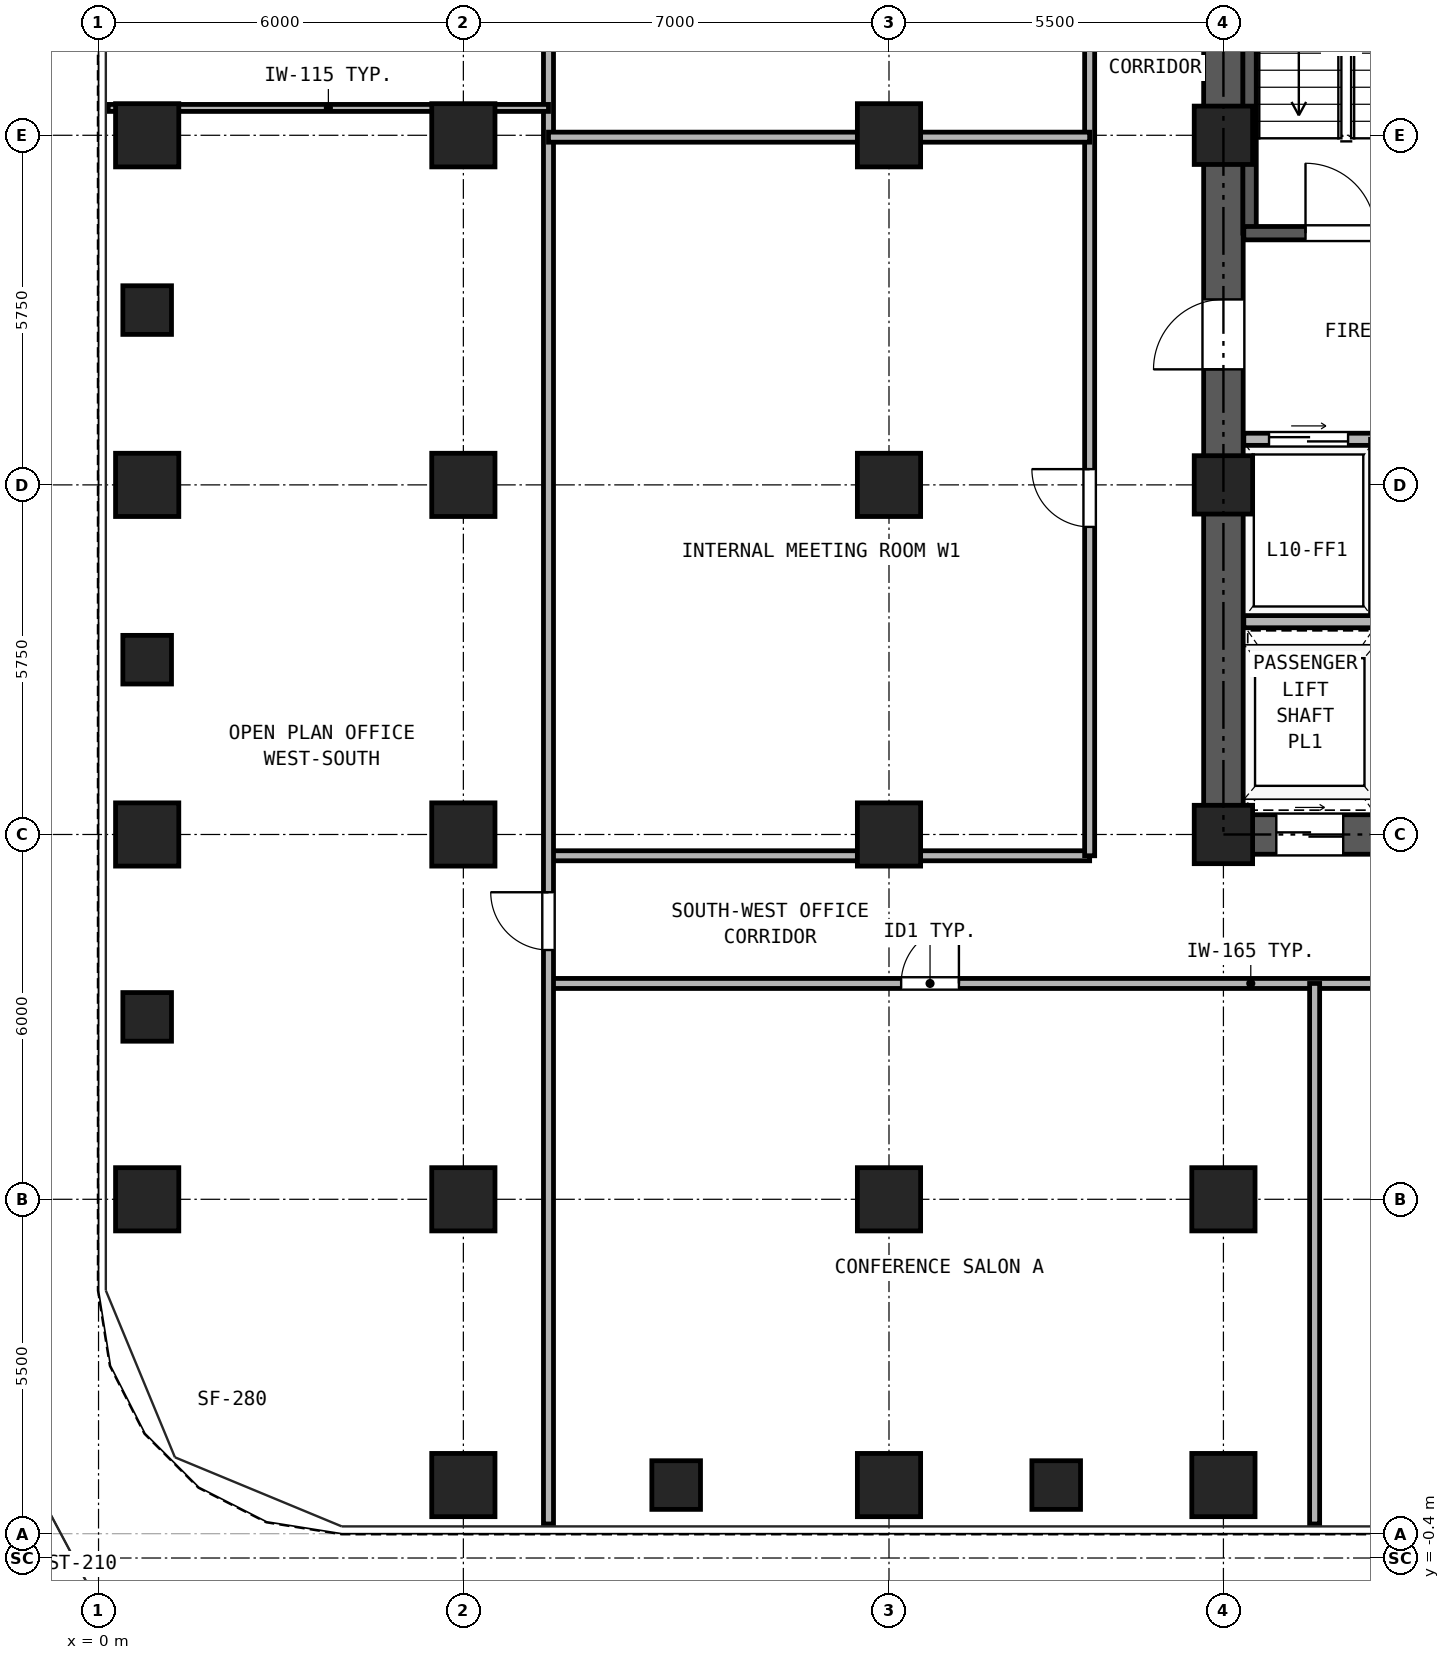
"""IFC4 building model, lengths in metres.
Left out: names, types, materials, properties, quantities, classifications, styles, units other than length and angle.
Written with IfcOpenShell. Run it as: python <this file> out.ifc"""

import sys

from ifc_helpers import new_model, si_unit, direction, frame, frame_2d, origin, origin_2d, place, context, subcontext, project, spatial, rectangle, hollow_rectangle, extrude, source, transform, mapped, element, fill, save


model = new_model("IFC4")
c1 = context("Model", 3, precision=1e-05, world=origin(), true_north=direction((0.0, 1.0)))
c2 = subcontext(c1, "Body", "Model", "MODEL_VIEW")
j1 = project(units=[si_unit("LENGTHUNIT", "METRE"), si_unit("PLANEANGLEUNIT", "RADIAN")], contexts=[c1])
p1 = place(None, origin())
s1 = spatial("IfcSite", under=j1, at=p1, CompositionType="ELEMENT")
p2 = place(p1, origin())
s2 = spatial("IfcBuilding", under=s1, at=p2, CompositionType="ELEMENT")
p3 = place(p2, frame((0.0, 0.0, 40.5)))
s3 = spatial("IfcBuildingStorey", under=s2, at=p3, CompositionType="ELEMENT", Elevation=40.5)
m1 = source(origin(), c2, "Body", "SweptSolid", [
    extrude(hollow_rectangle(XDim=1.04, YDim=1.04, WallThickness=0.065, at=origin_2d()), origin(), (0.0, 0.0, 1.0), 3.32),
])
for number, where, z_axis, x_axis in (
    (1, (6.0, 0.8, 0.0), (0.0, 0.0, 1.0), (1.0, 0.0, 0.0)),
    (2, (13.0, 0.8, 0.0), (0.0, 0.0, 1.0), (1.0, 0.0, 0.0)),
    (3, (18.5, 0.8, 0.0), (0.0, 0.0, 1.0), (1.0, 0.0, 0.0)),
    (4, (0.8, 5.5, 0.0), (0.0, 0.0, 1.0), (1.0, 0.0, 0.0)),
    (5, (0.8, 11.5, 0.0), (0.0, 0.0, 1.0), (1.0, 0.0, 0.0)),
    (6, (0.8, 17.25, 0.0), (0.0, 0.0, 1.0), (1.0, 0.0, 0.0)),
    (7, (0.8, 23.0, 0.0), (0.0, 0.0, 1.0), (1.0, 0.0, 0.0)),
    (8, (6.0, 5.5, 0.0), (0.0, 0.0, 1.0), (1.0, 0.0, 0.0)),
    (9, (6.0, 11.5, 0.0), (0.0, 0.0, 1.0), (1.0, 0.0, 0.0)),
    (10, (6.0, 17.25, 0.0), (0.0, 0.0, 1.0), (1.0, 0.0, 0.0)),
    (11, (6.0, 23.0, 0.0), (0.0, 0.0, 1.0), (1.0, 0.0, 0.0)),
    (12, (13.0, 5.5, 0.0), (0.0, 0.0, 1.0), (1.0, 0.0, 0.0)),
    (13, (13.0, 11.5, 0.0), (0.0, 0.0, 1.0), (1.0, 0.0, 0.0)),
    (14, (13.0, 17.25, 0.0), (0.0, 0.0, 1.0), (1.0, 0.0, 0.0)),
    (15, (13.0, 23.0, 0.0), (0.0, 0.0, 1.0), (1.0, 0.0, 0.0)),
    (16, (18.5, 5.5, 0.0), (0.0, 0.0, 1.0), (1.0, 0.0, 0.0)),
):
    element("IfcColumn", number, at=place(p3, frame(where, z_axis=z_axis, x_axis=x_axis)), inside=s3, PredefinedType="COLUMN", context=c2, shape_type="MappedRepresentation", body=[
        mapped(m1, transform((0.0, 0.0, 0.0), x_axis=(1.0, 0.0, 0.0), y_axis=(0.0, 1.0, 0.0), z_axis=(0.0, 0.0, 1.0), scale=1.0)),
    ])
m2 = source(origin(), c2, "Body", "SweptSolid", [
    extrude(hollow_rectangle(XDim=0.96, YDim=0.96, WallThickness=0.06, at=origin_2d()), origin(), (0.0, 0.0, 1.0), 3.32),
])
for number, where, z_axis, x_axis in (
    (17, (18.5, 11.5, 0.0), (0.0, 0.0, 1.0), (1.0, 0.0, 0.0)),
    (18, (18.5, 17.25, 0.0), (0.0, 0.0, 1.0), (1.0, 0.0, 0.0)),
    (19, (18.5, 23.0, 0.0), (0.0, 0.0, 1.0), (1.0, 0.0, 0.0)),
):
    element("IfcColumn", number, at=place(p3, frame(where, z_axis=z_axis, x_axis=x_axis)), inside=s3, PredefinedType="COLUMN", context=c2, shape_type="MappedRepresentation", body=[
        mapped(m2, transform((0.0, 0.0, 0.0), x_axis=(1.0, 0.0, 0.0), y_axis=(0.0, 1.0, 0.0), z_axis=(0.0, 0.0, 1.0), scale=1.0)),
    ])
m3 = source(origin(), c2, "Body", "SweptSolid", [
    extrude(hollow_rectangle(XDim=0.8, YDim=0.8, WallThickness=0.045, at=origin_2d()), origin(), (0.0, 0.0, 1.0), 3.32),
])
for number, where, z_axis, x_axis in (
    (20, (9.5, 0.8, 0.0), (0.0, 0.0, 1.0), (1.0, 0.0, 0.0)),
    (21, (15.75, 0.8, 0.0), (0.0, 0.0, 1.0), (1.0, 0.0, 0.0)),
    (22, (0.8, 8.5, 0.0), (0.0, 0.0, 1.0), (1.0, 0.0, 0.0)),
    (23, (0.8, 14.375, 0.0), (0.0, 0.0, 1.0), (1.0, 0.0, 0.0)),
    (24, (0.8, 20.125, 0.0), (0.0, 0.0, 1.0), (1.0, 0.0, 0.0)),
):
    element("IfcColumn", number, at=place(p3, frame(where, z_axis=z_axis, x_axis=x_axis)), inside=s3, PredefinedType="COLUMN", context=c2, shape_type="MappedRepresentation", body=[
        mapped(m3, transform((0.0, 0.0, 0.0), x_axis=(1.0, 0.0, 0.0), y_axis=(0.0, 1.0, 0.0), z_axis=(0.0, 0.0, 1.0), scale=1.0)),
    ])
p4 = place(p3, frame((18.175, 11.5, 0.0), z_axis=(0.0, 0.0, 1.0), x_axis=(1.0, 0.0, 0.0)))
e25 = element("IfcWall", 25, at=p4, inside=s3, PredefinedType="SHEAR", context=c2, shape_type="SweptSolid", body=[
    extrude(rectangle(XDim=10.65, YDim=0.65, at=frame_2d((5.325, 0.0))), origin(), (0.0, 0.0, 1.0), 3.32),
])
p5 = place(p4, frame((1.195, 0.0, 0.0)))
e26 = element("IfcOpeningElement", 26, at=p5, cuts=e25, PredefinedType="OPENING", context=c2, shape_type="SweptSolid", body=[
    extrude(rectangle(XDim=1.1, YDim=2.25, at=frame_2d((0.55, 1.125))), frame((0.0, 0.335, 0.0), z_axis=(0.0, -1.0, 0.0), x_axis=(1.0, 0.0, 0.0)), (0.0, 0.0, 1.0), 0.67),
])
p6 = place(p4, frame((3.495, 0.0, 0.0)))
e27 = element("IfcOpeningElement", 27, at=p6, cuts=e25, PredefinedType="OPENING", context=c2, shape_type="SweptSolid", body=[
    extrude(rectangle(XDim=1.1, YDim=2.25, at=frame_2d((0.55, 1.125))), frame((0.0, 0.335, 0.0), z_axis=(0.0, -1.0, 0.0), x_axis=(1.0, 0.0, 0.0)), (0.0, 0.0, 1.0), 0.67),
])
p7 = place(p4, frame((5.925, 0.0, 0.0)))
e28 = element("IfcOpeningElement", 28, at=p7, cuts=e25, PredefinedType="OPENING", context=c2, shape_type="SweptSolid", body=[
    extrude(rectangle(XDim=1.1, YDim=2.25, at=frame_2d((0.55, 1.125))), frame((0.0, 0.335, 0.0), z_axis=(0.0, -1.0, 0.0), x_axis=(1.0, 0.0, 0.0)), (0.0, 0.0, 1.0), 0.67),
])
p8 = place(p4, frame((8.325, 0.0, 0.0)))
e29 = element("IfcOpeningElement", 29, at=p8, cuts=e25, PredefinedType="OPENING", context=c2, shape_type="SweptSolid", body=[
    extrude(rectangle(XDim=1.1, YDim=2.25, at=frame_2d((0.55, 1.125))), frame((0.0, 0.335, 0.0), z_axis=(0.0, -1.0, 0.0), x_axis=(1.0, 0.0, 0.0)), (0.0, 0.0, 1.0), 0.67),
])
p9 = place(p3, frame((18.5, 11.825, 0.0), z_axis=(0.0, 0.0, 1.0), x_axis=(0.0, 1.0, 0.0)))
e30 = element("IfcWall", 30, at=p9, inside=s3, PredefinedType="SHEAR", context=c2, shape_type="SweptSolid", body=[
    extrude(rectangle(XDim=16.6, YDim=0.65, at=frame_2d((8.3, 0.0))), origin(), (0.0, 0.0, 1.0), 3.32),
])
p10 = place(p9, frame((7.325, 0.0, 0.0)))
e31 = element("IfcOpeningElement", 31, at=p10, cuts=e30, PredefinedType="OPENING", context=c2, shape_type="SweptSolid", body=[
    extrude(rectangle(XDim=1.15, YDim=2.2, at=frame_2d((0.575, 1.1))), frame((0.0, 0.335, 0.0), z_axis=(0.0, -1.0, 0.0), x_axis=(1.0, 0.0, 0.0)), (0.0, 0.0, 1.0), 0.67),
])
p11 = place(p3, frame((18.93, 21.39, 0.0), z_axis=(0.0, 0.0, 1.0), x_axis=(0.0, 1.0, 0.0)))
e32 = element("IfcWall", 32, at=p11, inside=s3, PredefinedType="SOLIDWALL", context=c2, shape_type="SweptSolid", body=[
    extrude(rectangle(XDim=7.11, YDim=0.22, at=frame_2d((3.555, 0.0))), origin(), (0.0, 0.0, 1.0), 3.32),
])
p12 = place(p3, frame((18.835, 21.39, 0.0), z_axis=(0.0, 0.0, 1.0), x_axis=(1.0, 0.0, 0.0)))
e33 = element("IfcWall", 33, at=p12, inside=s3, PredefinedType="SOLIDWALL", context=c2, shape_type="SweptSolid", body=[
    extrude(rectangle(XDim=6.295, YDim=0.22, at=frame_2d((3.147, 0.0))), origin(), (0.0, 0.0, 1.0), 3.32),
])
p13 = place(p12, frame((1.015, 0.0, 0.0)))
e34 = element("IfcOpeningElement", 34, at=p13, cuts=e33, PredefinedType="OPENING", context=c2, shape_type="SweptSolid", body=[
    extrude(rectangle(XDim=1.15, YDim=2.2, at=frame_2d((0.575, 1.1))), frame((0.0, 0.12, 0.0), z_axis=(0.0, -1.0, 0.0), x_axis=(1.0, 0.0, 0.0)), (0.0, 0.0, 1.0), 0.24),
])
p14 = place(p12, frame((4.745, 0.0, 0.0)))
e35 = element("IfcOpeningElement", 35, at=p14, cuts=e33, PredefinedType="OPENING", context=c2, shape_type="SweptSolid", body=[
    extrude(rectangle(XDim=1.1, YDim=2.25, at=frame_2d((0.55, 1.125))), frame((0.0, 0.12, 0.0), z_axis=(0.0, -1.0, 0.0), x_axis=(1.0, 0.0, 0.0)), (0.0, 0.0, 1.0), 0.24),
])
p15 = place(p3, frame((18.835, 18.0, 0.0), z_axis=(0.0, 0.0, 1.0), x_axis=(1.0, 0.0, 0.0)))
e36 = element("IfcWall", 36, at=p15, inside=s3, PredefinedType="PARTITIONING", context=c2, shape_type="SweptSolid", body=[
    extrude(rectangle(XDim=9.33, YDim=0.2, at=frame_2d((4.665, 0.0))), origin(), (0.0, 0.0, 1.0), 3.32),
])
p16 = place(p15, frame((0.415, 0.0, 0.0)))
e37 = element("IfcOpeningElement", 37, at=p16, cuts=e36, PredefinedType="OPENING", context=c2, shape_type="SweptSolid", body=[
    extrude(rectangle(XDim=1.3, YDim=2.3, at=frame_2d((0.65, 1.15))), frame((0.0, 0.11, 0.0), z_axis=(0.0, -1.0, 0.0), x_axis=(1.0, 0.0, 0.0)), (0.0, 0.0, 1.0), 0.22),
])
p17 = place(p15, frame((2.515, 0.0, 0.0)))
e38 = element("IfcOpeningElement", 38, at=p17, cuts=e36, PredefinedType="OPENING", context=c2, shape_type="SweptSolid", body=[
    extrude(rectangle(XDim=1.3, YDim=2.3, at=frame_2d((0.65, 1.15))), frame((0.0, 0.11, 0.0), z_axis=(0.0, -1.0, 0.0), x_axis=(1.0, 0.0, 0.0)), (0.0, 0.0, 1.0), 0.22),
])
p18 = place(p15, frame((7.015, 0.0, 0.0)))
e39 = element("IfcOpeningElement", 39, at=p18, cuts=e36, PredefinedType="OPENING", context=c2, shape_type="SweptSolid", body=[
    extrude(rectangle(XDim=1.0, YDim=2.15, at=frame_2d((0.5, 1.075))), frame((0.0, 0.11, 0.0), z_axis=(0.0, -1.0, 0.0), x_axis=(1.0, 0.0, 0.0)), (0.0, 0.0, 1.0), 0.22),
])
p19 = place(p3, frame((18.835, 15.0, 0.0), z_axis=(0.0, 0.0, 1.0), x_axis=(1.0, 0.0, 0.0)))
e40 = element("IfcWall", 40, at=p19, inside=s3, PredefinedType="PARTITIONING", context=c2, shape_type="SweptSolid", body=[
    extrude(rectangle(XDim=9.33, YDim=0.2, at=frame_2d((4.665, 0.0))), origin(), (0.0, 0.0, 1.0), 3.32),
])
p20 = place(p3, frame((7.4, 9.05, 0.0), z_axis=(0.0, 0.0, 1.0), x_axis=(1.0, 0.0, 0.0)))
e41 = element("IfcWall", 41, at=p20, inside=s3, PredefinedType="PARTITIONING", context=c2, shape_type="SweptSolid", body=[
    extrude(rectangle(XDim=32.2, YDim=0.165, at=frame_2d((16.1, 0.0))), origin(), (0.0, 0.0, 1.0), 3.32),
])
p21 = place(p20, frame((5.8, 0.0, 0.0)))
e42 = element("IfcOpeningElement", 42, at=p21, cuts=e41, PredefinedType="OPENING", context=c2, shape_type="SweptSolid", body=[
    extrude(rectangle(XDim=0.95, YDim=2.15, at=frame_2d((0.475, 1.075))), frame((0.0, 0.093, 0.0), z_axis=(0.0, -1.0, 0.0), x_axis=(1.0, 0.0, 0.0)), (0.0, 0.0, 1.0), 0.185),
])
p22 = place(p20, frame((16.35, 0.0, 0.0)))
e43 = element("IfcOpeningElement", 43, at=p22, cuts=e41, PredefinedType="OPENING", context=c2, shape_type="SweptSolid", body=[
    extrude(rectangle(XDim=0.95, YDim=2.15, at=frame_2d((0.475, 1.075))), frame((0.0, 0.093, 0.0), z_axis=(0.0, -1.0, 0.0), x_axis=(1.0, 0.0, 0.0)), (0.0, 0.0, 1.0), 0.185),
])
p23 = place(p20, frame((23.6, 0.0, 0.0)))
e44 = element("IfcOpeningElement", 44, at=p23, cuts=e41, PredefinedType="OPENING", context=c2, shape_type="SweptSolid", body=[
    extrude(rectangle(XDim=0.95, YDim=2.15, at=frame_2d((0.475, 1.075))), frame((0.0, 0.093, 0.0), z_axis=(0.0, -1.0, 0.0), x_axis=(1.0, 0.0, 0.0)), (0.0, 0.0, 1.0), 0.185),
])
p24 = place(p20, frame((27.95, 0.0, 0.0)))
e45 = element("IfcOpeningElement", 45, at=p24, cuts=e41, PredefinedType="OPENING", context=c2, shape_type="SweptSolid", body=[
    extrude(rectangle(XDim=0.92, YDim=2.1, at=frame_2d((0.46, 1.05))), frame((0.0, 0.093, 0.0), z_axis=(0.0, -1.0, 0.0), x_axis=(1.0, 0.0, 0.0)), (0.0, 0.0, 1.0), 0.185),
])
p25 = place(p20, frame((30.5, 0.0, 0.0)))
e46 = element("IfcOpeningElement", 46, at=p25, cuts=e41, PredefinedType="OPENING", context=c2, shape_type="SweptSolid", body=[
    extrude(rectangle(XDim=0.92, YDim=2.1, at=frame_2d((0.46, 1.05))), frame((0.0, 0.093, 0.0), z_axis=(0.0, -1.0, 0.0), x_axis=(1.0, 0.0, 0.0)), (0.0, 0.0, 1.0), 0.185),
])
p26 = place(p3, frame((7.4, 11.15, 0.0), z_axis=(0.0, 0.0, 1.0), x_axis=(1.0, 0.0, 0.0)))
e47 = element("IfcWall", 47, at=p26, inside=s3, PredefinedType="PARTITIONING", context=c2, shape_type="SweptSolid", body=[
    extrude(rectangle(XDim=8.9, YDim=0.165, at=frame_2d((4.45, 0.0))), origin(), (0.0, 0.0, 1.0), 3.32),
])
p27 = place(p3, frame((16.3, 11.15, 0.0), z_axis=(0.0, 0.0, 1.0), x_axis=(0.0, 1.0, 0.0)))
e48 = element("IfcWall", 48, at=p27, inside=s3, PredefinedType="PARTITIONING", context=c2, shape_type="SweptSolid", body=[
    extrude(rectangle(XDim=18.25, YDim=0.165, at=frame_2d((9.125, 0.0))), origin(), (0.0, 0.0, 1.0), 3.32),
])
p28 = place(p27, frame((5.409, 0.0, 0.0)))
e49 = element("IfcOpeningElement", 49, at=p28, cuts=e48, PredefinedType="OPENING", context=c2, shape_type="SweptSolid", body=[
    extrude(rectangle(XDim=0.95, YDim=2.15, at=frame_2d((0.475, 1.075))), frame((0.0, 0.093, 0.0), z_axis=(0.0, -1.0, 0.0), x_axis=(1.0, 0.0, 0.0)), (0.0, 0.0, 1.0), 0.185),
])
p29 = place(p27, frame((14.534, 0.0, 0.0)))
e50 = element("IfcOpeningElement", 50, at=p29, cuts=e48, PredefinedType="OPENING", context=c2, shape_type="SweptSolid", body=[
    extrude(rectangle(XDim=0.95, YDim=2.15, at=frame_2d((0.475, 1.075))), frame((0.0, 0.093, 0.0), z_axis=(0.0, -1.0, 0.0), x_axis=(1.0, 0.0, 0.0)), (0.0, 0.0, 1.0), 0.185),
])
p30 = place(p3, frame((7.4, 0.16, 0.0), z_axis=(0.0, 0.0, 1.0), x_axis=(0.0, 1.0, 0.0)))
e51 = element("IfcWall", 51, at=p30, inside=s3, PredefinedType="PARTITIONING", context=c2, shape_type="SweptSolid", body=[
    extrude(rectangle(XDim=40.18, YDim=0.165, at=frame_2d((20.09, 0.0))), origin(), (0.0, 0.0, 1.0), 3.32),
])
p31 = place(p30, frame((9.44, 0.0, 0.0)))
e52 = element("IfcOpeningElement", 52, at=p31, cuts=e51, PredefinedType="OPENING", context=c2, shape_type="SweptSolid", body=[
    extrude(rectangle(XDim=0.95, YDim=2.15, at=frame_2d((0.475, 1.075))), frame((0.0, 0.093, 0.0), z_axis=(0.0, -1.0, 0.0), x_axis=(1.0, 0.0, 0.0)), (0.0, 0.0, 1.0), 0.185),
])
p32 = place(p30, frame((29.79, 0.0, 0.0)))
e53 = element("IfcOpeningElement", 53, at=p32, cuts=e51, PredefinedType="OPENING", context=c2, shape_type="SweptSolid", body=[
    extrude(rectangle(XDim=0.95, YDim=2.15, at=frame_2d((0.475, 1.075))), frame((0.0, 0.093, 0.0), z_axis=(0.0, -1.0, 0.0), x_axis=(1.0, 0.0, 0.0)), (0.0, 0.0, 1.0), 0.185),
])
p33 = place(p3, frame((20.0, 0.16, 0.0), z_axis=(0.0, 0.0, 1.0), x_axis=(0.0, 1.0, 0.0)))
e54 = element("IfcWall", 54, at=p33, inside=s3, PredefinedType="PARTITIONING", context=c2, shape_type="SweptSolid", body=[
    extrude(rectangle(XDim=8.89, YDim=0.165, at=frame_2d((4.445, 0.0))), origin(), (0.0, 0.0, 1.0), 3.32),
])
p34 = place(p3, frame((0.16, 23.45, 0.0), z_axis=(0.0, 0.0, 1.0), x_axis=(1.0, 0.0, 0.0)))
e55 = element("IfcWall", 55, at=p34, inside=s3, PredefinedType="PARTITIONING", context=c2, shape_type="SweptSolid", body=[
    extrude(rectangle(XDim=7.24, YDim=0.115, at=frame_2d((3.62, 0.0))), origin(), (0.0, 0.0, 1.0), 3.32),
])
p35 = place(p3, frame((7.4, 22.969, 0.0), z_axis=(0.0, 0.0, 1.0), x_axis=(1.0, 0.0, 0.0)))
e56 = element("IfcWall", 56, at=p35, inside=s3, PredefinedType="PARTITIONING", context=c2, shape_type="SweptSolid", body=[
    extrude(rectangle(XDim=8.9, YDim=0.165, at=frame_2d((4.45, 0.0))), origin(), (0.0, 0.0, 1.0), 2.539),
])
p36 = place(p13, frame((1.15, 0.0, 0.0), z_axis=(0.0, 0.0, 1.0), x_axis=(-1.0, 0.0, 0.0)))
e57 = element("IfcDoor", 57, at=p36, inside=s3, OperationType="SINGLE_SWING_LEFT", PredefinedType="DOOR", context=c2, shape_type="SweptSolid", body=[
    extrude(rectangle(XDim=1.15, YDim=2.2, at=frame_2d((0.575, 1.1))), frame((0.0, 0.025, 0.0), z_axis=(0.0, -1.0, 0.0), x_axis=(1.0, 0.0, 0.0)), (0.0, 0.0, 1.0), 0.05),
])
fill(e34, e57)
p37 = place(p16, origin())
e58 = element("IfcDoor", 58, at=p37, inside=s3, OperationType="DOUBLE_DOOR_SLIDING", PredefinedType="DOOR", context=c2, shape_type="SweptSolid", body=[
    extrude(rectangle(XDim=1.3, YDim=2.3, at=frame_2d((0.65, 1.15))), frame((0.0, 0.025, 0.0), z_axis=(0.0, -1.0, 0.0), x_axis=(1.0, 0.0, 0.0)), (0.0, 0.0, 1.0), 0.05),
])
fill(e37, e58)
p38 = place(p10, frame((1.15, 0.0, 0.0), z_axis=(0.0, 0.0, 1.0), x_axis=(-1.0, 0.0, 0.0)))
e59 = element("IfcDoor", 59, at=p38, inside=s3, OperationType="SINGLE_SWING_LEFT", PredefinedType="DOOR", context=c2, shape_type="SweptSolid", body=[
    extrude(rectangle(XDim=1.15, YDim=2.2, at=frame_2d((0.575, 1.1))), frame((0.0, 0.025, 0.0), z_axis=(0.0, -1.0, 0.0), x_axis=(1.0, 0.0, 0.0)), (0.0, 0.0, 1.0), 0.05),
])
fill(e31, e59)
p39 = place(p5, frame((1.1, 0.0, 0.0), z_axis=(0.0, 0.0, 1.0), x_axis=(-1.0, 0.0, 0.0)))
e60 = element("IfcDoor", 60, at=p39, inside=s3, OperationType="DOUBLE_DOOR_SLIDING", PredefinedType="DOOR", context=c2, shape_type="SweptSolid", body=[
    extrude(rectangle(XDim=1.1, YDim=2.25, at=frame_2d((0.55, 1.125))), frame((0.0, 0.025, 0.0), z_axis=(0.0, -1.0, 0.0), x_axis=(1.0, 0.0, 0.0)), (0.0, 0.0, 1.0), 0.05),
])
fill(e26, e60)
p40 = place(p21, frame((0.95, 0.0, 0.0), z_axis=(0.0, 0.0, 1.0), x_axis=(-1.0, 0.0, 0.0)))
e61 = element("IfcDoor", 61, at=p40, inside=s3, OperationType="SINGLE_SWING_RIGHT", PredefinedType="DOOR", context=c2, shape_type="SweptSolid", body=[
    extrude(rectangle(XDim=0.95, YDim=2.15, at=frame_2d((0.475, 1.075))), frame((0.0, 0.025, 0.0), z_axis=(0.0, -1.0, 0.0), x_axis=(1.0, 0.0, 0.0)), (0.0, 0.0, 1.0), 0.05),
])
fill(e42, e61)
p41 = place(p31, frame((0.95, 0.0, 0.0), z_axis=(0.0, 0.0, 1.0), x_axis=(-1.0, 0.0, 0.0)))
e62 = element("IfcDoor", 62, at=p41, inside=s3, OperationType="SINGLE_SWING_RIGHT", PredefinedType="DOOR", context=c2, shape_type="SweptSolid", body=[
    extrude(rectangle(XDim=0.95, YDim=2.15, at=frame_2d((0.475, 1.075))), frame((0.0, 0.025, 0.0), z_axis=(0.0, -1.0, 0.0), x_axis=(1.0, 0.0, 0.0)), (0.0, 0.0, 1.0), 0.05),
])
fill(e52, e62)
p42 = place(p28, frame((0.95, 0.0, 0.0), z_axis=(0.0, 0.0, 1.0), x_axis=(-1.0, 0.0, 0.0)))
e63 = element("IfcDoor", 63, at=p42, inside=s3, OperationType="SINGLE_SWING_RIGHT", PredefinedType="DOOR", context=c2, shape_type="SweptSolid", body=[
    extrude(rectangle(XDim=0.95, YDim=2.15, at=frame_2d((0.475, 1.075))), frame((0.0, 0.025, 0.0), z_axis=(0.0, -1.0, 0.0), x_axis=(1.0, 0.0, 0.0)), (0.0, 0.0, 1.0), 0.05),
])
fill(e49, e63)
save(model, sys.argv[1])
